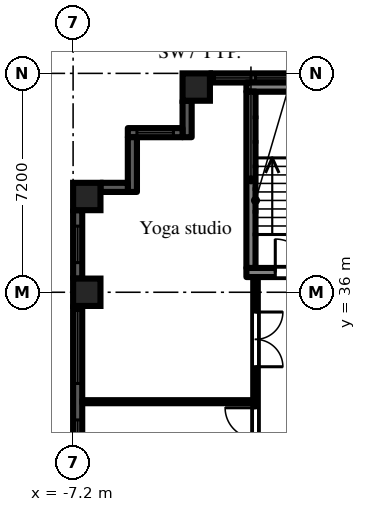
"""IFC4 building model, lengths in metres.
Left out: names, types, materials, properties, quantities, classifications, styles, units other than length and angle.
Written with IfcOpenShell. Run it as: python <this file> out.ifc"""

import sys

from ifc_helpers import new_model, si_unit, direction, frame, frame_2d, origin, origin_2d, place, context, subcontext, project, spatial, rectangle, extrude, element, fill, save


model = new_model("IFC4")
c1 = context("Model", 3, precision=1e-05, world=origin(), true_north=direction((0.0, 1.0)))
c2 = subcontext(c1, "Body", "Model", "MODEL_VIEW")
j1 = project(units=[si_unit("LENGTHUNIT", "METRE"), si_unit("PLANEANGLEUNIT", "RADIAN")], contexts=[c1])
p1 = place(None, origin())
s1 = spatial("IfcSite", under=j1, at=p1, CompositionType="ELEMENT")
p2 = place(p1, origin())
s2 = spatial("IfcBuilding", under=s1, at=p2, CompositionType="ELEMENT")
p3 = place(p2, frame((0.0, 0.0, 59.7)))
s3 = spatial("IfcBuildingStorey", under=s2, at=p3, CompositionType="ELEMENT", Elevation=59.7)
for number, where, z_axis, x_axis in (
    (1, (-6.75, 36.0, 0.0), (0.0, 0.0, 1.0), (1.0, 0.0, 0.0)),
    (2, (-6.75, 39.15, 0.0), (0.0, 0.0, 1.0), (1.0, 0.0, 0.0)),
    (3, (-3.15, 42.75, 0.0), (0.0, 0.0, 1.0), (1.0, 0.0, 0.0)),
):
    element("IfcColumn", number, at=place(p3, frame(where, z_axis=z_axis, x_axis=x_axis)), inside=s3, PredefinedType="COLUMN", context=c2, shape_type="SweptSolid", body=[
        extrude(rectangle(XDim=0.9, YDim=0.9, at=origin_2d()), origin(), (0.0, 0.0, 1.0), 3.0),
    ])
p4 = place(p3, frame((2.7, 43.05, 0.0), z_axis=(0.0, 0.0, 1.0), x_axis=(-1.0, 0.0, 0.0)))
e4 = element("IfcWall", 4, at=p4, inside=s3, PredefinedType="SOLIDWALL", context=c2, shape_type="SweptSolid", body=[
    extrude(rectangle(XDim=5.4, YDim=0.3, at=frame_2d((2.7, 0.0))), origin(), (0.0, 0.0, 1.0), 2.1),
])
p5 = place(p4, frame((1.5, 0.0, 0.2)))
e5 = element("IfcOpeningElement", 5, at=p5, cuts=e4, PredefinedType="OPENING", context=c2, shape_type="SweptSolid", body=[
    extrude(rectangle(XDim=2.4, YDim=1.85, at=frame_2d((1.2, 0.925))), frame((0.0, 0.16, 0.0), z_axis=(0.0, -1.0, 0.0), x_axis=(1.0, 0.0, 0.0)), (0.0, 0.0, 1.0), 0.32),
])
p6 = place(p4, frame((0.15, 0.0, 0.2)))
e6 = element("IfcOpeningElement", 6, at=p6, cuts=e4, PredefinedType="OPENING", context=c2, shape_type="SweptSolid", body=[
    extrude(rectangle(XDim=1.2, YDim=1.85, at=frame_2d((0.6, 0.925))), frame((0.0, 0.16, 0.0), z_axis=(0.0, -1.0, 0.0), x_axis=(1.0, 0.0, 0.0)), (0.0, 0.0, 1.0), 0.32),
])
p7 = place(p4, frame((4.05, 0.0, 0.2)))
e7 = element("IfcOpeningElement", 7, at=p7, cuts=e4, PredefinedType="OPENING", context=c2, shape_type="SweptSolid", body=[
    extrude(rectangle(XDim=1.2, YDim=1.85, at=frame_2d((0.6, 0.925))), frame((0.0, 0.16, 0.0), z_axis=(0.0, -1.0, 0.0), x_axis=(1.0, 0.0, 0.0)), (0.0, 0.0, 1.0), 0.32),
])
p8 = place(p3, frame((-3.45, 42.3, 0.0), z_axis=(0.0, 0.0, 1.0), x_axis=(0.0, -1.0, 0.0)))
e8 = element("IfcWall", 8, at=p8, inside=s3, PredefinedType="SOLIDWALL", context=c2, shape_type="SweptSolid", body=[
    extrude(rectangle(XDim=1.2, YDim=0.3, at=frame_2d((0.6, 0.0))), origin(), (0.0, 0.0, 1.0), 2.55),
])
p9 = place(p3, frame((-3.6, 41.25, 0.0), z_axis=(0.0, 0.0, 1.0), x_axis=(-1.0, 0.0, 0.0)))
e9 = element("IfcWall", 9, at=p9, inside=s3, PredefinedType="SOLIDWALL", context=c2, shape_type="SweptSolid", body=[
    extrude(rectangle(XDim=1.8, YDim=0.3, at=frame_2d((0.9, 0.0))), origin(), (0.0, 0.0, 1.0), 2.55),
])
p10 = place(p9, frame((0.3, 0.0, 0.2)))
e10 = element("IfcOpeningElement", 10, at=p10, cuts=e9, PredefinedType="OPENING", context=c2, shape_type="SweptSolid", body=[
    extrude(rectangle(XDim=1.2, YDim=1.85, at=frame_2d((0.6, 0.925))), frame((0.0, 0.16, 0.0), z_axis=(0.0, -1.0, 0.0), x_axis=(1.0, 0.0, 0.0)), (0.0, 0.0, 1.0), 0.32),
])
p11 = place(p3, frame((-5.25, 41.1, 0.0), z_axis=(0.0, 0.0, 1.0), x_axis=(0.0, -1.0, 0.0)))
e11 = element("IfcWall", 11, at=p11, inside=s3, PredefinedType="SOLIDWALL", context=c2, shape_type="SweptSolid", body=[
    extrude(rectangle(XDim=1.8, YDim=0.3, at=frame_2d((0.9, 0.0))), origin(), (0.0, 0.0, 1.0), 2.55),
])
p12 = place(p3, frame((-5.4, 39.45, 0.0), z_axis=(0.0, 0.0, 1.0), x_axis=(-1.0, 0.0, 0.0)))
e12 = element("IfcWall", 12, at=p12, inside=s3, PredefinedType="SOLIDWALL", context=c2, shape_type="SweptSolid", body=[
    extrude(rectangle(XDim=0.9, YDim=0.3, at=frame_2d((0.45, 0.0))), origin(), (0.0, 0.0, 1.0), 2.55),
])
p13 = place(p3, frame((-7.05, 38.7, 0.0), z_axis=(0.0, 0.0, 1.0), x_axis=(0.0, -1.0, 0.0)))
e13 = element("IfcWall", 13, at=p13, inside=s3, PredefinedType="SOLIDWALL", context=c2, shape_type="SweptSolid", body=[
    extrude(rectangle(XDim=2.25, YDim=0.3, at=frame_2d((1.125, 0.0))), origin(), (0.0, 0.0, 1.0), 2.1),
])
p14 = place(p13, frame((0.525, 0.0, 0.2)))
e14 = element("IfcOpeningElement", 14, at=p14, cuts=e13, PredefinedType="OPENING", context=c2, shape_type="SweptSolid", body=[
    extrude(rectangle(XDim=1.2, YDim=1.85, at=frame_2d((0.6, 0.925))), frame((0.0, 0.16, 0.0), z_axis=(0.0, -1.0, 0.0), x_axis=(1.0, 0.0, 0.0)), (0.0, 0.0, 1.0), 0.32),
])
p15 = place(p3, frame((-7.05, 35.55, 0.0), z_axis=(0.0, 0.0, 1.0), x_axis=(0.0, -1.0, 0.0)))
e15 = element("IfcWall", 15, at=p15, inside=s3, PredefinedType="SOLIDWALL", context=c2, shape_type="SweptSolid", body=[
    extrude(rectangle(XDim=6.3, YDim=0.3, at=frame_2d((3.15, 0.0))), origin(), (0.0, 0.0, 1.0), 2.1),
])
p16 = place(p15, frame((0.15, 0.0, 0.2)))
e16 = element("IfcOpeningElement", 16, at=p16, cuts=e15, PredefinedType="OPENING", context=c2, shape_type="SweptSolid", body=[
    extrude(rectangle(XDim=2.4, YDim=1.85, at=frame_2d((1.2, 0.925))), frame((0.0, 0.16, 0.0), z_axis=(0.0, -1.0, 0.0), x_axis=(1.0, 0.0, 0.0)), (0.0, 0.0, 1.0), 0.32),
])
p17 = place(p15, frame((3.75, 0.0, 0.2)))
e17 = element("IfcOpeningElement", 17, at=p17, cuts=e15, PredefinedType="OPENING", context=c2, shape_type="SweptSolid", body=[
    extrude(rectangle(XDim=2.4, YDim=1.85, at=frame_2d((1.2, 0.925))), frame((0.0, 0.16, 0.0), z_axis=(0.0, -1.0, 0.0), x_axis=(1.0, 0.0, 0.0)), (0.0, 0.0, 1.0), 0.32),
])
p18 = place(p3, frame((-1.5, 36.65, 0.0), z_axis=(0.0, 0.0, 1.0), x_axis=(1.0, 0.0, 0.0)))
e18 = element("IfcWall", 18, at=p18, inside=s3, PredefinedType="SHEAR", context=c2, shape_type="SweptSolid", body=[
    extrude(rectangle(XDim=3.0, YDim=0.3, at=frame_2d((1.5, 0.0))), origin(), (0.0, 0.0, 1.0), 2.55),
])
p19 = place(p18, frame((0.95, 0.0, 0.0)))
e19 = element("IfcOpeningElement", 19, at=p19, cuts=e18, PredefinedType="OPENING", context=c2, shape_type="SweptSolid", body=[
    extrude(rectangle(XDim=1.1, YDim=2.1, at=frame_2d((0.55, 1.05))), frame((0.0, 0.16, 0.0), z_axis=(0.0, -1.0, 0.0), x_axis=(1.0, 0.0, 0.0)), (0.0, 0.0, 1.0), 0.32),
])
p20 = place(p3, frame((-1.5, 42.75, 0.0), z_axis=(0.0, 0.0, 1.0), x_axis=(1.0, 0.0, 0.0)))
e20 = element("IfcWall", 20, at=p20, inside=s3, PredefinedType="SHEAR", context=c2, shape_type="SweptSolid", body=[
    extrude(rectangle(XDim=3.0, YDim=0.3, at=frame_2d((1.5, 0.0))), origin(), (0.0, 0.0, 1.0), 2.55),
])
p21 = place(p3, frame((-1.35, 36.8, 0.0), z_axis=(0.0, 0.0, 1.0), x_axis=(0.0, 1.0, 0.0)))
e21 = element("IfcWall", 21, at=p21, inside=s3, PredefinedType="SHEAR", context=c2, shape_type="SweptSolid", body=[
    extrude(rectangle(XDim=5.8, YDim=0.3, at=frame_2d((2.9, 0.0))), origin(), (0.0, 0.0, 1.0), 2.55),
])
p22 = place(p3, frame((-6.9, 32.4, 0.0), z_axis=(0.0, 0.0, 1.0), x_axis=(1.0, 0.0, 0.0)))
e22 = element("IfcWall", 22, at=p22, inside=s3, PredefinedType="PARTITIONING", context=c2, shape_type="SweptSolid", body=[
    extrude(rectangle(XDim=5.625, YDim=0.1, at=frame_2d((2.812, 0.0))), origin(), (0.0, 0.0, 1.0), 2.55),
])
p23 = place(p3, frame((-1.2, 1.275, 0.0), z_axis=(0.0, 0.0, 1.0), x_axis=(0.0, 1.0, 0.0)))
e23 = element("IfcWall", 23, at=p23, inside=s3, PredefinedType="PARTITIONING", context=c2, shape_type="SweptSolid", body=[
    extrude(rectangle(XDim=35.225, YDim=0.15, at=frame_2d((17.613, 0.0))), origin(), (0.0, 0.0, 1.0), 2.55),
])
p24 = place(p23, frame((2.475, 0.0, 0.0)))
e24 = element("IfcOpeningElement", 24, at=p24, cuts=e23, PredefinedType="OPENING", context=c2, shape_type="SweptSolid", body=[
    extrude(rectangle(XDim=0.9, YDim=2.1, at=frame_2d((0.45, 1.05))), frame((0.0, 0.085, 0.0), z_axis=(0.0, -1.0, 0.0), x_axis=(1.0, 0.0, 0.0)), (0.0, 0.0, 1.0), 0.17),
])
p25 = place(p23, frame((11.275, 0.0, 0.0)))
e25 = element("IfcOpeningElement", 25, at=p25, cuts=e23, PredefinedType="OPENING", context=c2, shape_type="SweptSolid", body=[
    extrude(rectangle(XDim=0.9, YDim=2.1, at=frame_2d((0.45, 1.05))), frame((0.0, 0.085, 0.0), z_axis=(0.0, -1.0, 0.0), x_axis=(1.0, 0.0, 0.0)), (0.0, 0.0, 1.0), 0.17),
])
p26 = place(p23, frame((7.675, 0.0, 0.0)))
e26 = element("IfcOpeningElement", 26, at=p26, cuts=e23, PredefinedType="OPENING", context=c2, shape_type="SweptSolid", body=[
    extrude(rectangle(XDim=0.9, YDim=2.1, at=frame_2d((0.45, 1.05))), frame((0.0, 0.085, 0.0), z_axis=(0.0, -1.0, 0.0), x_axis=(1.0, 0.0, 0.0)), (0.0, 0.0, 1.0), 0.17),
])
p27 = place(p23, frame((19.125, 0.0, 0.0)))
e27 = element("IfcOpeningElement", 27, at=p27, cuts=e23, PredefinedType="OPENING", context=c2, shape_type="SweptSolid", body=[
    extrude(rectangle(XDim=1.0, YDim=2.1, at=frame_2d((0.5, 1.05))), frame((0.0, 0.085, 0.0), z_axis=(0.0, -1.0, 0.0), x_axis=(1.0, 0.0, 0.0)), (0.0, 0.0, 1.0), 0.17),
])
p28 = place(p23, frame((21.675, 0.0, 0.0)))
e28 = element("IfcOpeningElement", 28, at=p28, cuts=e23, PredefinedType="OPENING", context=c2, shape_type="SweptSolid", body=[
    extrude(rectangle(XDim=0.9, YDim=2.1, at=frame_2d((0.45, 1.05))), frame((0.0, 0.085, 0.0), z_axis=(0.0, -1.0, 0.0), x_axis=(1.0, 0.0, 0.0)), (0.0, 0.0, 1.0), 0.17),
])
p29 = place(p23, frame((29.925, 0.0, 0.0)))
e29 = element("IfcOpeningElement", 29, at=p29, cuts=e23, PredefinedType="OPENING", context=c2, shape_type="SweptSolid", body=[
    extrude(rectangle(XDim=1.0, YDim=2.1, at=frame_2d((0.5, 1.05))), frame((0.0, 0.085, 0.0), z_axis=(0.0, -1.0, 0.0), x_axis=(1.0, 0.0, 0.0)), (0.0, 0.0, 1.0), 0.17),
])
p30 = place(p23, frame((32.275, 0.0, 0.0)))
e30 = element("IfcOpeningElement", 30, at=p30, cuts=e23, PredefinedType="OPENING", context=c2, shape_type="SweptSolid", body=[
    extrude(rectangle(XDim=1.8, YDim=2.1, at=frame_2d((0.9, 1.05))), frame((0.0, 0.085, 0.0), z_axis=(0.0, -1.0, 0.0), x_axis=(1.0, 0.0, 0.0)), (0.0, 0.0, 1.0), 0.17),
])
p31 = place(p5, origin())
e31 = element("IfcWindow", 31, at=p31, inside=s3, PartitioningType="SINGLE_PANEL", PredefinedType="WINDOW", context=c2, shape_type="SweptSolid", body=[
    extrude(rectangle(XDim=2.4, YDim=1.85, at=frame_2d((1.2, 0.925))), frame((0.0, 0.03, 0.0), z_axis=(0.0, -1.0, 0.0), x_axis=(1.0, 0.0, 0.0)), (0.0, 0.0, 1.0), 0.06),
])
fill(e5, e31)
p32 = place(p7, origin())
e32 = element("IfcWindow", 32, at=p32, inside=s3, PartitioningType="SINGLE_PANEL", PredefinedType="WINDOW", context=c2, shape_type="SweptSolid", body=[
    extrude(rectangle(XDim=1.2, YDim=1.85, at=frame_2d((0.6, 0.925))), frame((0.0, 0.03, 0.0), z_axis=(0.0, -1.0, 0.0), x_axis=(1.0, 0.0, 0.0)), (0.0, 0.0, 1.0), 0.06),
])
fill(e7, e32)
p33 = place(p10, origin())
e33 = element("IfcWindow", 33, at=p33, inside=s3, PartitioningType="SINGLE_PANEL", PredefinedType="WINDOW", context=c2, shape_type="SweptSolid", body=[
    extrude(rectangle(XDim=1.2, YDim=1.85, at=frame_2d((0.6, 0.925))), frame((0.0, 0.03, 0.0), z_axis=(0.0, -1.0, 0.0), x_axis=(1.0, 0.0, 0.0)), (0.0, 0.0, 1.0), 0.06),
])
fill(e10, e33)
p34 = place(p14, origin())
e34 = element("IfcWindow", 34, at=p34, inside=s3, PartitioningType="SINGLE_PANEL", PredefinedType="WINDOW", context=c2, shape_type="SweptSolid", body=[
    extrude(rectangle(XDim=1.2, YDim=1.85, at=frame_2d((0.6, 0.925))), frame((0.0, 0.03, 0.0), z_axis=(0.0, -1.0, 0.0), x_axis=(1.0, 0.0, 0.0)), (0.0, 0.0, 1.0), 0.06),
])
fill(e14, e34)
p35 = place(p16, origin())
e35 = element("IfcWindow", 35, at=p35, inside=s3, PartitioningType="SINGLE_PANEL", PredefinedType="WINDOW", context=c2, shape_type="SweptSolid", body=[
    extrude(rectangle(XDim=2.4, YDim=1.85, at=frame_2d((1.2, 0.925))), frame((0.0, 0.03, 0.0), z_axis=(0.0, -1.0, 0.0), x_axis=(1.0, 0.0, 0.0)), (0.0, 0.0, 1.0), 0.06),
])
fill(e16, e35)
p36 = place(p17, origin())
e36 = element("IfcWindow", 36, at=p36, inside=s3, PartitioningType="SINGLE_PANEL", PredefinedType="WINDOW", context=c2, shape_type="SweptSolid", body=[
    extrude(rectangle(XDim=2.4, YDim=1.85, at=frame_2d((1.2, 0.925))), frame((0.0, 0.03, 0.0), z_axis=(0.0, -1.0, 0.0), x_axis=(1.0, 0.0, 0.0)), (0.0, 0.0, 1.0), 0.06),
])
fill(e17, e36)
p37 = place(p19, origin())
e37 = element("IfcDoor", 37, at=p37, inside=s3, OperationType="SINGLE_SWING_LEFT", PredefinedType="DOOR", context=c2, shape_type="SweptSolid", body=[
    extrude(rectangle(XDim=1.1, YDim=2.1, at=frame_2d((0.55, 1.05))), frame((0.0, 0.025, 0.0), z_axis=(0.0, -1.0, 0.0), x_axis=(1.0, 0.0, 0.0)), (0.0, 0.0, 1.0), 0.05),
])
fill(e19, e37)
p38 = place(p29, origin())
e38 = element("IfcDoor", 38, at=p38, inside=s3, OperationType="SINGLE_SWING_RIGHT", PredefinedType="DOOR", context=c2, shape_type="SweptSolid", body=[
    extrude(rectangle(XDim=1.0, YDim=2.1, at=frame_2d((0.5, 1.05))), frame((0.0, 0.025, 0.0), z_axis=(0.0, -1.0, 0.0), x_axis=(1.0, 0.0, 0.0)), (0.0, 0.0, 1.0), 0.05),
])
fill(e29, e38)
p39 = place(p30, frame((1.8, 0.0, 0.0), z_axis=(0.0, 0.0, 1.0), x_axis=(-1.0, 0.0, 0.0)))
e39 = element("IfcDoor", 39, at=p39, inside=s3, OperationType="DOUBLE_DOOR_DOUBLE_SWING", PredefinedType="DOOR", context=c2, shape_type="SweptSolid", body=[
    extrude(rectangle(XDim=1.8, YDim=2.1, at=frame_2d((0.9, 1.05))), frame((0.0, 0.025, 0.0), z_axis=(0.0, -1.0, 0.0), x_axis=(1.0, 0.0, 0.0)), (0.0, 0.0, 1.0), 0.05),
])
fill(e30, e39)
save(model, sys.argv[1])
